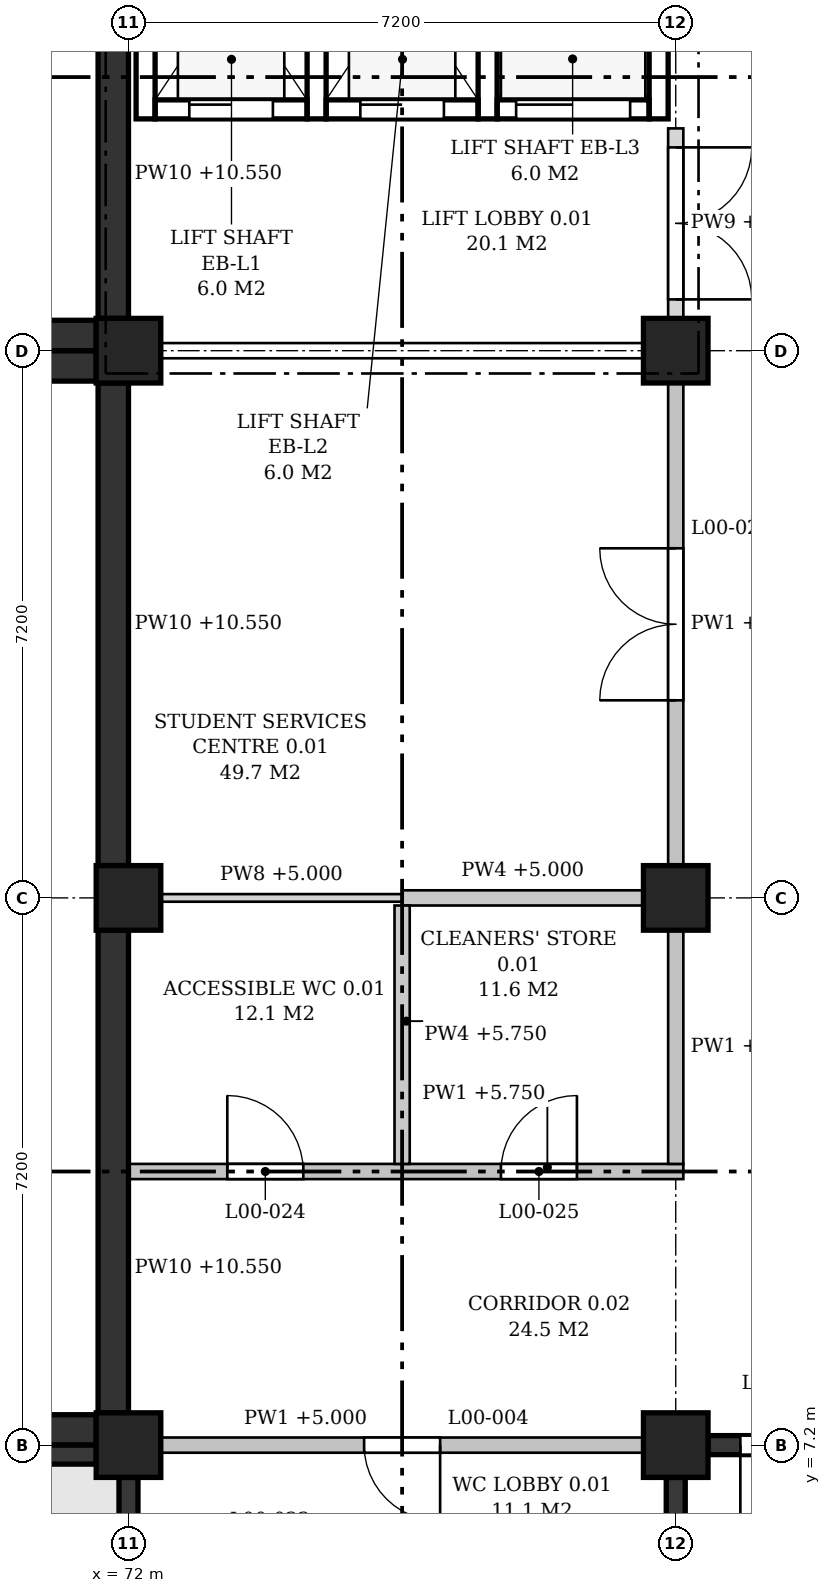
"""IFC4 building model, lengths in metres.
Left out: names, types, materials, properties, quantities, classifications, styles, units other than length and angle.
Written with IfcOpenShell. Run it as: python <this file> out.ifc"""

import sys

from ifc_helpers import new_model, si_unit, direction, frame, frame_2d, origin, origin_2d, place, context, subcontext, project, spatial, polyline, rectangle, outline, extrude, element, fill, save


model = new_model("IFC4")
c1 = context("Model", 3, precision=1e-05, world=origin(), true_north=direction((0.0, 1.0)))
c2 = subcontext(c1, "Body", "Model", "MODEL_VIEW")
j1 = project(units=[si_unit("LENGTHUNIT", "METRE"), si_unit("PLANEANGLEUNIT", "RADIAN")], contexts=[c1])
p1 = place(None, origin())
s1 = spatial("IfcSite", under=j1, at=p1, CompositionType="ELEMENT")
p2 = place(p1, origin())
s2 = spatial("IfcBuilding", under=s1, at=p2, CompositionType="ELEMENT")
p3 = place(p2, origin())
s3 = spatial("IfcBuildingStorey", under=s2, at=p3, CompositionType="ELEMENT", Elevation=0.0)
for number, where, z_axis, x_axis in (
    (1, (72.0, 7.2, 0.0), (0.0, 0.0, 1.0), (1.0, 0.0, 0.0)),
    (2, (72.0, 14.4, 0.0), (0.0, 0.0, 1.0), (1.0, 0.0, 0.0)),
    (3, (72.0, 21.6, 0.0), (0.0, 0.0, 1.0), (1.0, 0.0, 0.0)),
    (4, (79.2, 7.2, 0.0), (0.0, 0.0, 1.0), (1.0, 0.0, 0.0)),
    (5, (79.2, 14.4, 0.0), (0.0, 0.0, 1.0), (1.0, 0.0, 0.0)),
    (6, (79.2, 21.6, 0.0), (0.0, 0.0, 1.0), (1.0, 0.0, 0.0)),
):
    element("IfcColumn", number, at=place(p3, frame(where, z_axis=z_axis, x_axis=x_axis)), inside=s3, PredefinedType="COLUMN", context=c2, shape_type="SweptSolid", body=[
        extrude(rectangle(XDim=0.85, YDim=0.85, at=origin_2d()), origin(), (0.0, 0.0, 1.0), 6.0),
    ])
p4 = place(p3, frame((79.625, 7.2, 0.0), z_axis=(0.0, 0.0, 1.0), x_axis=(1.0, 0.0, 0.0)))
e7 = element("IfcWall", 7, at=p4, inside=s3, PredefinedType="SHEAR", context=c2, shape_type="SweptSolid", body=[
    extrude(rectangle(XDim=6.35, YDim=0.25, at=frame_2d((3.175, 0.0))), origin(), (0.0, 0.0, 1.0), 5.0),
])
p5 = place(p4, frame((0.425, 0.0, 0.0)))
e8 = element("IfcOpeningElement", 8, at=p5, cuts=e7, PredefinedType="OPENING", context=c2, shape_type="SweptSolid", body=[
    extrude(rectangle(XDim=1.1, YDim=2.1, at=frame_2d((0.55, 1.05))), frame((0.0, 0.135, 0.0), z_axis=(0.0, -1.0, 0.0), x_axis=(1.0, 0.0, 0.0)), (0.0, 0.0, 1.0), 0.27),
])
p6 = place(p3, frame((79.2, 0.425, 0.0), z_axis=(0.0, 0.0, 1.0), x_axis=(0.0, 1.0, 0.0)))
e9 = element("IfcWall", 9, at=p6, inside=s3, PredefinedType="SHEAR", context=c2, shape_type="SweptSolid", body=[
    extrude(rectangle(XDim=6.35, YDim=0.25, at=frame_2d((3.175, 0.0))), origin(), (0.0, 0.0, 1.0), 5.0),
])
p7 = place(p3, frame((65.225, 7.075, 0.0), z_axis=(0.0, 0.0, 1.0), x_axis=(1.0, 0.0, 0.0)))
e10 = element("IfcWall", 10, at=p7, inside=s3, PredefinedType="SHEAR", context=c2, shape_type="SweptSolid", body=[
    extrude(rectangle(XDim=6.35, YDim=0.25, at=frame_2d((3.175, 0.0))), origin(), (0.0, 0.0, 1.0), 5.05),
])
p8 = place(p3, frame((72.0, 0.425, 0.0), z_axis=(0.0, 0.0, 1.0), x_axis=(0.0, 1.0, 0.0)))
e11 = element("IfcWall", 11, at=p8, inside=s3, PredefinedType="SHEAR", context=c2, shape_type="SweptSolid", body=[
    extrude(rectangle(XDim=6.35, YDim=0.25, at=frame_2d((3.175, 0.0))), origin(), (0.0, 0.0, 1.0), 5.0),
])
p9 = place(p3, frame((72.225, 24.65, -0.3), z_axis=(0.0, 0.0, 1.0), x_axis=(0.0, 1.0, 0.0)))
e12 = element("IfcWall", 12, at=p9, inside=s3, PredefinedType="SHEAR", context=c2, shape_type="SweptSolid", body=[
    extrude(rectangle(XDim=3.725, YDim=0.25, at=frame_2d((1.863, 0.0))), origin(), (0.0, 0.0, 1.0), 5.35),
])
for number, where, z_axis, x_axis in (
    (13, (74.475, 24.65, -0.3), (0.0, 0.0, 1.0), (0.0, 1.0, 0.0)),
    (14, (76.725, 24.65, -0.3), (0.0, 0.0, 1.0), (0.0, 1.0, 0.0)),
):
    element("IfcWall", number, at=place(p3, frame(where, z_axis=z_axis, x_axis=x_axis)), inside=s3, PredefinedType="SHEAR", context=c2, shape_type="SweptSolid", body=[
        extrude(rectangle(XDim=3.5, YDim=0.25, at=frame_2d((1.75, 0.0))), origin(), (0.0, 0.0, 1.0), 6.05),
    ])
p10 = place(p3, frame((78.975, 24.65, -0.3), z_axis=(0.0, 0.0, 1.0), x_axis=(0.0, 1.0, 0.0)))
e15 = element("IfcWall", 15, at=p10, inside=s3, PredefinedType="SHEAR", context=c2, shape_type="SweptSolid", body=[
    extrude(rectangle(XDim=3.725, YDim=0.25, at=frame_2d((1.863, 0.0))), origin(), (0.0, 0.0, 1.0), 6.05),
])
p11 = place(p3, frame((72.35, 24.775, -0.3), z_axis=(0.0, 0.0, 1.0), x_axis=(1.0, 0.0, 0.0)))
e16 = element("IfcWall", 16, at=p11, inside=s3, PredefinedType="SHEAR", context=c2, shape_type="SweptSolid", body=[
    extrude(rectangle(XDim=2.0, YDim=0.25, at=frame_2d((1.0, 0.0))), origin(), (0.0, 0.0, 1.0), 6.05),
])
p12 = place(p11, frame((0.45, 0.0, 0.3)))
e17 = element("IfcOpeningElement", 17, at=p12, cuts=e16, PredefinedType="OPENING", context=c2, shape_type="SweptSolid", body=[
    extrude(rectangle(XDim=1.1, YDim=2.1, at=frame_2d((0.55, 1.05))), frame((0.0, 0.135, 0.0), z_axis=(0.0, -1.0, 0.0), x_axis=(1.0, 0.0, 0.0)), (0.0, 0.0, 1.0), 0.27),
])
p13 = place(p3, frame((74.6, 24.775, -0.3), z_axis=(0.0, 0.0, 1.0), x_axis=(1.0, 0.0, 0.0)))
e18 = element("IfcWall", 18, at=p13, inside=s3, PredefinedType="SHEAR", context=c2, shape_type="SweptSolid", body=[
    extrude(rectangle(XDim=2.0, YDim=0.25, at=frame_2d((1.0, 0.0))), origin(), (0.0, 0.0, 1.0), 6.05),
])
p14 = place(p13, frame((0.45, 0.0, 0.3)))
e19 = element("IfcOpeningElement", 19, at=p14, cuts=e18, PredefinedType="OPENING", context=c2, shape_type="SweptSolid", body=[
    extrude(rectangle(XDim=1.1, YDim=2.1, at=frame_2d((0.55, 1.05))), frame((0.0, 0.135, 0.0), z_axis=(0.0, -1.0, 0.0), x_axis=(1.0, 0.0, 0.0)), (0.0, 0.0, 1.0), 0.27),
])
p15 = place(p3, frame((76.85, 24.775, -0.3), z_axis=(0.0, 0.0, 1.0), x_axis=(1.0, 0.0, 0.0)))
e20 = element("IfcWall", 20, at=p15, inside=s3, PredefinedType="SHEAR", context=c2, shape_type="SweptSolid", body=[
    extrude(rectangle(XDim=2.0, YDim=0.25, at=frame_2d((1.0, 0.0))), origin(), (0.0, 0.0, 1.0), 6.05),
])
p16 = place(p15, frame((0.25, 0.0, 0.3)))
e21 = element("IfcOpeningElement", 21, at=p16, cuts=e20, PredefinedType="OPENING", context=c2, shape_type="SweptSolid", body=[
    extrude(rectangle(XDim=1.5, YDim=2.1, at=frame_2d((0.75, 1.05))), frame((0.0, 0.135, 0.0), z_axis=(0.0, -1.0, 0.0), x_axis=(1.0, 0.0, 0.0)), (0.0, 0.0, 1.0), 0.27),
])
p17 = place(p3, frame((72.425, 7.2, 0.0), z_axis=(0.0, 0.0, 1.0), x_axis=(1.0, 0.0, 0.0)))
e22 = element("IfcWall", 22, at=p17, inside=s3, PredefinedType="PARTITIONING", context=c2, shape_type="SweptSolid", body=[
    extrude(rectangle(XDim=6.35, YDim=0.2, at=frame_2d((3.175, 0.0))), origin(), (0.0, 0.0, 1.0), 5.0),
])
p18 = place(p17, frame((2.675, 0.0, 0.0)))
e23 = element("IfcOpeningElement", 23, at=p18, cuts=e22, PredefinedType="OPENING", context=c2, shape_type="SweptSolid", body=[
    extrude(rectangle(XDim=1.0, YDim=2.1, at=frame_2d((0.5, 1.05))), frame((0.0, 0.11, 0.0), z_axis=(0.0, -1.0, 0.0), x_axis=(1.0, 0.0, 0.0)), (0.0, 0.0, 1.0), 0.22),
])
p19 = place(p3, frame((65.225, 7.4, 0.0), z_axis=(0.0, 0.0, 1.0), x_axis=(1.0, 0.0, 0.0)))
e24 = element("IfcWall", 24, at=p19, inside=s3, PredefinedType="SOLIDWALL", context=c2, shape_type="SweptSolid", body=[
    extrude(rectangle(XDim=6.35, YDim=0.4, at=frame_2d((3.175, 0.0))), origin(), (0.0, 0.0, 1.0), 10.7),
])
p20 = place(p3, frame((72.0, 10.8, 0.0), z_axis=(0.0, 0.0, 1.0), x_axis=(1.0, 0.0, 0.0)))
e25 = element("IfcWall", 25, at=p20, inside=s3, PredefinedType="PARTITIONING", context=c2, shape_type="SweptSolid", body=[
    extrude(outline(polyline([(0.0, 0.0), (7.3, 0.0), (7.3, 5.0), (6.95, 5.0), (6.95, 5.75), (0.55, 5.75), (0.55, 5.05), (0.0, 5.05), (0.0, 0.0)])), frame((0.0, 0.1, 0.0), z_axis=(0.0, -1.0, 0.0), x_axis=(1.0, 0.0, 0.0)), (0.0, 0.0, 1.0), 0.2),
])
p21 = place(p20, frame((1.3, 0.0, 0.0)))
e26 = element("IfcOpeningElement", 26, at=p21, cuts=e25, PredefinedType="OPENING", context=c2, shape_type="SweptSolid", body=[
    extrude(rectangle(XDim=1.0, YDim=2.1, at=frame_2d((0.5, 1.05))), frame((0.0, 0.11, 0.0), z_axis=(0.0, -1.0, 0.0), x_axis=(1.0, 0.0, 0.0)), (0.0, 0.0, 1.0), 0.22),
])
p22 = place(p20, frame((4.9, 0.0, 0.0)))
e27 = element("IfcOpeningElement", 27, at=p22, cuts=e25, PredefinedType="OPENING", context=c2, shape_type="SweptSolid", body=[
    extrude(rectangle(XDim=1.0, YDim=2.1, at=frame_2d((0.5, 1.05))), frame((0.0, 0.11, 0.0), z_axis=(0.0, -1.0, 0.0), x_axis=(1.0, 0.0, 0.0)), (0.0, 0.0, 1.0), 0.22),
])
p23 = place(p3, frame((72.425, 14.4, 0.0), z_axis=(0.0, 0.0, 1.0), x_axis=(1.0, 0.0, 0.0)))
e28 = element("IfcWall", 28, at=p23, inside=s3, PredefinedType="PARTITIONING", context=c2, shape_type="SweptSolid", body=[
    extrude(rectangle(XDim=3.175, YDim=0.1, at=frame_2d((1.587, 0.0))), origin(), (0.0, 0.0, 1.0), 5.0),
])
p24 = place(p3, frame((75.6, 14.4, 0.0), z_axis=(0.0, 0.0, 1.0), x_axis=(1.0, 0.0, 0.0)))
e29 = element("IfcWall", 29, at=p24, inside=s3, PredefinedType="PARTITIONING", context=c2, shape_type="SweptSolid", body=[
    extrude(rectangle(XDim=3.175, YDim=0.2, at=frame_2d((1.587, 0.0))), origin(), (0.0, 0.0, 1.0), 5.0),
])
p25 = place(p3, frame((65.225, 21.4, 0.0), z_axis=(0.0, 0.0, 1.0), x_axis=(1.0, 0.0, 0.0)))
e30 = element("IfcWall", 30, at=p25, inside=s3, PredefinedType="SOLIDWALL", context=c2, shape_type="SweptSolid", body=[
    extrude(rectangle(XDim=6.35, YDim=0.4, at=frame_2d((3.175, 0.0))), origin(), (0.0, 0.0, 1.0), 10.7),
])
p26 = place(p3, frame((72.425, 21.6, 0.0), z_axis=(0.0, 0.0, 1.0), x_axis=(1.0, 0.0, 0.0)))
e31 = element("IfcWall", 31, at=p26, inside=s3, PredefinedType="PARTITIONING", context=c2, shape_type="SweptSolid", body=[
    extrude(rectangle(XDim=6.35, YDim=0.2, at=frame_2d((3.175, 0.0))), origin(), (0.0, 0.0, 1.0), 5.0),
])
p27 = place(p3, frame((65.225, 21.8, 0.0), z_axis=(0.0, 0.0, 1.0), x_axis=(1.0, 0.0, 0.0)))
e32 = element("IfcWall", 32, at=p27, inside=s3, PredefinedType="SOLIDWALL", context=c2, shape_type="SweptSolid", body=[
    extrude(rectangle(XDim=6.35, YDim=0.4, at=frame_2d((3.175, 0.0))), origin(), (0.0, 0.0, 1.0), 10.7),
])
for number, where, z_axis, x_axis in (
    (33, (71.8, 7.625, 0.0), (0.0, 0.0, 1.0), (0.0, 1.0, 0.0)),
    (34, (71.8, 14.825, 0.0), (0.0, 0.0, 1.0), (0.0, 1.0, 0.0)),
    (35, (71.8, 22.025, 0.0), (0.0, 0.0, 1.0), (0.0, 1.0, 0.0)),
):
    element("IfcWall", number, at=place(p3, frame(where, z_axis=z_axis, x_axis=x_axis)), inside=s3, PredefinedType="SOLIDWALL", context=c2, shape_type="SweptSolid", body=[
        extrude(rectangle(XDim=6.35, YDim=0.4, at=frame_2d((3.175, 0.0))), origin(), (0.0, 0.0, 1.0), 10.55),
    ])
p28 = place(p3, frame((75.6, 10.9, 0.0), z_axis=(0.0, 0.0, 1.0), x_axis=(0.0, 1.0, 0.0)))
e36 = element("IfcWall", 36, at=p28, inside=s3, PredefinedType="PARTITIONING", context=c2, shape_type="SweptSolid", body=[
    extrude(outline(polyline([(0.0, 0.0), (3.4, 0.0), (3.4, 5.0), (3.25, 5.0), (3.25, 5.75), (0.0, 5.75), (0.0, 0.0)])), frame((0.0, 0.1, 0.0), z_axis=(0.0, -1.0, 0.0), x_axis=(1.0, 0.0, 0.0)), (0.0, 0.0, 1.0), 0.2),
])
p29 = place(p3, frame((79.2, 10.9, 0.0), z_axis=(0.0, 0.0, 1.0), x_axis=(0.0, 1.0, 0.0)))
e37 = element("IfcWall", 37, at=p29, inside=s3, PredefinedType="PARTITIONING", context=c2, shape_type="SweptSolid", body=[
    extrude(rectangle(XDim=3.075, YDim=0.2, at=frame_2d((1.538, 0.0))), origin(), (0.0, 0.0, 1.0), 5.0),
])
p30 = place(p3, frame((79.2, 14.825, 0.0), z_axis=(0.0, 0.0, 1.0), x_axis=(0.0, 1.0, 0.0)))
e38 = element("IfcWall", 38, at=p30, inside=s3, PredefinedType="PARTITIONING", context=c2, shape_type="SweptSolid", body=[
    extrude(rectangle(XDim=6.35, YDim=0.2, at=frame_2d((3.175, 0.0))), origin(), (0.0, 0.0, 1.0), 5.0),
])
p31 = place(p30, frame((2.175, 0.0, 0.0)))
e39 = element("IfcOpeningElement", 39, at=p31, cuts=e38, PredefinedType="OPENING", context=c2, shape_type="SweptSolid", body=[
    extrude(rectangle(XDim=2.0, YDim=2.1, at=frame_2d((1.0, 1.05))), frame((0.0, 0.11, 0.0), z_axis=(0.0, -1.0, 0.0), x_axis=(1.0, 0.0, 0.0)), (0.0, 0.0, 1.0), 0.22),
])
p32 = place(p3, frame((79.2, 22.025, 0.0), z_axis=(0.0, 0.0, 1.0), x_axis=(0.0, 1.0, 0.0)))
e40 = element("IfcWall", 40, at=p32, inside=s3, PredefinedType="PARTITIONING", context=c2, shape_type="SweptSolid", body=[
    extrude(rectangle(XDim=2.5, YDim=0.2, at=frame_2d((1.25, 0.0))), origin(), (0.0, 0.0, 1.0), 5.0),
])
p33 = place(p32, frame((0.25, 0.0, 0.0)))
e41 = element("IfcOpeningElement", 41, at=p33, cuts=e40, PredefinedType="OPENING", context=c2, shape_type="SweptSolid", body=[
    extrude(rectangle(XDim=2.0, YDim=2.4, at=frame_2d((1.0, 1.2))), frame((0.0, 0.11, 0.0), z_axis=(0.0, -1.0, 0.0), x_axis=(1.0, 0.0, 0.0)), (0.0, 0.0, 1.0), 0.22),
])
p34 = place(p5, frame((1.1, 0.0, 0.0), z_axis=(0.0, 0.0, 1.0), x_axis=(-1.0, 0.0, 0.0)))
e42 = element("IfcDoor", 42, at=p34, inside=s3, OperationType="SINGLE_SWING_RIGHT", PredefinedType="DOOR", context=c2, shape_type="SweptSolid", body=[
    extrude(rectangle(XDim=1.1, YDim=2.1, at=frame_2d((0.55, 1.05))), frame((0.0, 0.025, 0.0), z_axis=(0.0, -1.0, 0.0), x_axis=(1.0, 0.0, 0.0)), (0.0, 0.0, 1.0), 0.05),
])
fill(e8, e42)
p35 = place(p12, origin())
e43 = element("IfcDoor", 43, at=p35, inside=s3, OperationType="SLIDING_TO_LEFT", PredefinedType="DOOR", context=c2, shape_type="SweptSolid", body=[
    extrude(rectangle(XDim=1.1, YDim=2.1, at=frame_2d((0.55, 1.05))), frame((0.0, 0.025, 0.0), z_axis=(0.0, -1.0, 0.0), x_axis=(1.0, 0.0, 0.0)), (0.0, 0.0, 1.0), 0.05),
])
fill(e17, e43)
p36 = place(p14, origin())
e44 = element("IfcDoor", 44, at=p36, inside=s3, OperationType="SLIDING_TO_LEFT", PredefinedType="DOOR", context=c2, shape_type="SweptSolid", body=[
    extrude(rectangle(XDim=1.1, YDim=2.1, at=frame_2d((0.55, 1.05))), frame((0.0, 0.025, 0.0), z_axis=(0.0, -1.0, 0.0), x_axis=(1.0, 0.0, 0.0)), (0.0, 0.0, 1.0), 0.05),
])
fill(e19, e44)
p37 = place(p16, origin())
e45 = element("IfcDoor", 45, at=p37, inside=s3, OperationType="SLIDING_TO_LEFT", PredefinedType="DOOR", context=c2, shape_type="SweptSolid", body=[
    extrude(rectangle(XDim=1.5, YDim=2.1, at=frame_2d((0.75, 1.05))), frame((0.0, 0.025, 0.0), z_axis=(0.0, -1.0, 0.0), x_axis=(1.0, 0.0, 0.0)), (0.0, 0.0, 1.0), 0.05),
])
fill(e21, e45)
p38 = place(p33, origin())
e46 = element("IfcDoor", 46, at=p38, inside=s3, OperationType="DOUBLE_DOOR_SINGLE_SWING", PredefinedType="DOOR", context=c2, shape_type="SweptSolid", body=[
    extrude(rectangle(XDim=2.0, YDim=2.4, at=frame_2d((1.0, 1.2))), frame((0.0, 0.025, 0.0), z_axis=(0.0, -1.0, 0.0), x_axis=(1.0, 0.0, 0.0)), (0.0, 0.0, 1.0), 0.05),
])
fill(e41, e46)
p39 = place(p18, frame((1.0, 0.0, 0.0), z_axis=(0.0, 0.0, 1.0), x_axis=(-1.0, 0.0, 0.0)))
e47 = element("IfcDoor", 47, at=p39, inside=s3, OperationType="SINGLE_SWING_LEFT", PredefinedType="DOOR", context=c2, shape_type="SweptSolid", body=[
    extrude(rectangle(XDim=1.0, YDim=2.1, at=frame_2d((0.5, 1.05))), frame((0.0, 0.025, 0.0), z_axis=(0.0, -1.0, 0.0), x_axis=(1.0, 0.0, 0.0)), (0.0, 0.0, 1.0), 0.05),
])
fill(e23, e47)
p40 = place(p21, origin())
e48 = element("IfcDoor", 48, at=p40, inside=s3, OperationType="SINGLE_SWING_LEFT", PredefinedType="DOOR", context=c2, shape_type="SweptSolid", body=[
    extrude(rectangle(XDim=1.0, YDim=2.1, at=frame_2d((0.5, 1.05))), frame((0.0, 0.025, 0.0), z_axis=(0.0, -1.0, 0.0), x_axis=(1.0, 0.0, 0.0)), (0.0, 0.0, 1.0), 0.05),
])
fill(e26, e48)
p41 = place(p22, origin())
e49 = element("IfcDoor", 49, at=p41, inside=s3, OperationType="SINGLE_SWING_RIGHT", PredefinedType="DOOR", context=c2, shape_type="SweptSolid", body=[
    extrude(rectangle(XDim=1.0, YDim=2.1, at=frame_2d((0.5, 1.05))), frame((0.0, 0.025, 0.0), z_axis=(0.0, -1.0, 0.0), x_axis=(1.0, 0.0, 0.0)), (0.0, 0.0, 1.0), 0.05),
])
fill(e27, e49)
p42 = place(p31, origin())
e50 = element("IfcDoor", 50, at=p42, inside=s3, OperationType="DOUBLE_DOOR_SINGLE_SWING", PredefinedType="DOOR", context=c2, shape_type="SweptSolid", body=[
    extrude(rectangle(XDim=2.0, YDim=2.1, at=frame_2d((1.0, 1.05))), frame((0.0, 0.025, 0.0), z_axis=(0.0, -1.0, 0.0), x_axis=(1.0, 0.0, 0.0)), (0.0, 0.0, 1.0), 0.05),
])
fill(e39, e50)
save(model, sys.argv[1])
